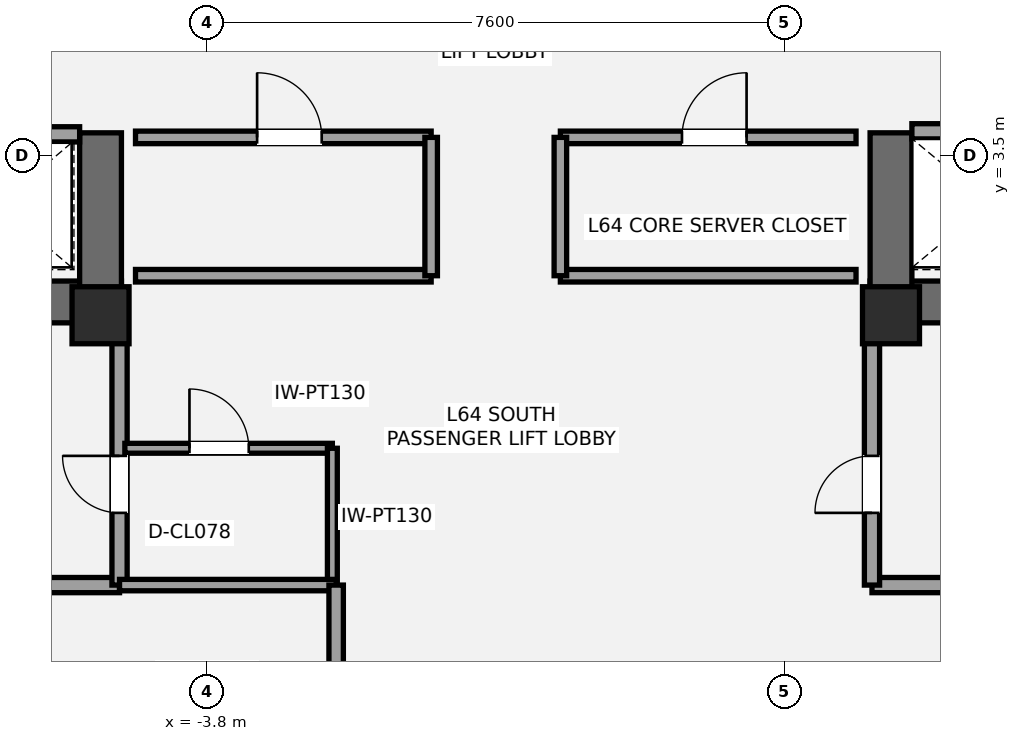
"""IFC4 building model, lengths in metres.
Left out: names, types, materials, properties, quantities, classifications, styles, units other than length and angle.
Written with IfcOpenShell. Run it as: python <this file> out.ifc"""

import sys

from ifc_helpers import new_model, si_unit, direction, frame, frame_2d, origin, origin_2d, place, context, subcontext, project, spatial, rectangle, extrude, element, fill, save


model = new_model("IFC4")
c1 = context("Model", 3, precision=1e-05, world=origin(), true_north=direction((0.0, 1.0)))
c2 = subcontext(c1, "Body", "Model", "MODEL_VIEW")
j1 = project(units=[si_unit("LENGTHUNIT", "METRE"), si_unit("PLANEANGLEUNIT", "RADIAN")], contexts=[c1])
p1 = place(None, origin())
s1 = spatial("IfcSite", under=j1, at=p1, CompositionType="ELEMENT")
p2 = place(p1, origin())
s2 = spatial("IfcBuilding", under=s1, at=p2, CompositionType="ELEMENT")
p3 = place(p2, frame((0.0, 0.0, 228.9)))
s3 = spatial("IfcBuildingStorey", under=s2, at=p3, CompositionType="ELEMENT", Elevation=228.9)
p4 = place(p3, frame((-4.925, 1.575, 0.0), z_axis=(0.0, 0.0, 1.0), x_axis=(-1.0, 0.0, 0.0)))
e1 = element("IfcWall", 1, at=p4, inside=s3, PredefinedType="SHEAR", context=c2, shape_type="SweptSolid", body=[
    extrude(rectangle(XDim=8.775, YDim=0.55, at=frame_2d((4.387, 0.0))), origin(), (0.0, 0.0, 1.0), 3.15),
])
p5 = place(p4, frame((5.375, 0.0, 0.0)))
e2 = element("IfcOpeningElement", 2, at=p5, cuts=e1, PredefinedType="OPENING", context=c2, shape_type="SweptSolid", body=[
    extrude(rectangle(XDim=1.05, YDim=2.15, at=frame_2d((0.525, 1.075))), frame((0.0, 0.285, 0.0), z_axis=(0.0, -1.0, 0.0), x_axis=(1.0, 0.0, 0.0)), (0.0, 0.0, 1.0), 0.57),
])
p6 = place(p4, frame((3.705, 0.0, 0.0)))
e3 = element("IfcOpeningElement", 3, at=p6, cuts=e1, PredefinedType="OPENING", context=c2, shape_type="SweptSolid", body=[
    extrude(rectangle(XDim=1.1, YDim=2.2, at=frame_2d((0.55, 1.1))), frame((0.0, 0.285, 0.0), z_axis=(0.0, -1.0, 0.0), x_axis=(1.0, 0.0, 0.0)), (0.0, 0.0, 1.0), 0.57),
])
p7 = place(p3, frame((-5.2, 1.3, 0.0), z_axis=(0.0, 0.0, 1.0), x_axis=(0.0, 1.0, 0.0)))
e4 = element("IfcWall", 4, at=p7, inside=s3, PredefinedType="SHEAR", context=c2, shape_type="SweptSolid", body=[
    extrude(rectangle(XDim=2.5, YDim=0.55, at=frame_2d((1.25, 0.0))), origin(), (0.0, 0.0, 1.0), 3.15),
])
p8 = place(p3, frame((13.7, 1.575, 0.0), z_axis=(0.0, 0.0, 1.0), x_axis=(-1.0, 0.0, 0.0)))
e5 = element("IfcWall", 5, at=p8, inside=s3, PredefinedType="SHEAR", context=c2, shape_type="SweptSolid", body=[
    extrude(rectangle(XDim=8.775, YDim=0.55, at=frame_2d((4.387, 0.0))), origin(), (0.0, 0.0, 1.0), 3.15),
])
p9 = place(p8, frame((2.35, 0.0, 0.0)))
e6 = element("IfcOpeningElement", 6, at=p9, cuts=e5, PredefinedType="OPENING", context=c2, shape_type="SweptSolid", body=[
    extrude(rectangle(XDim=1.05, YDim=2.15, at=frame_2d((0.525, 1.075))), frame((0.0, 0.285, 0.0), z_axis=(0.0, -1.0, 0.0), x_axis=(1.0, 0.0, 0.0)), (0.0, 0.0, 1.0), 0.57),
])
p10 = place(p8, frame((4.35, 0.0, 0.0)))
e7 = element("IfcOpeningElement", 7, at=p10, cuts=e5, PredefinedType="OPENING", context=c2, shape_type="SweptSolid", body=[
    extrude(rectangle(XDim=1.1, YDim=2.2, at=frame_2d((0.55, 1.1))), frame((0.0, 0.285, 0.0), z_axis=(0.0, -1.0, 0.0), x_axis=(1.0, 0.0, 0.0)), (0.0, 0.0, 1.0), 0.57),
])
p11 = place(p3, frame((5.2, 1.3, 0.0), z_axis=(0.0, 0.0, 1.0), x_axis=(0.0, 1.0, 0.0)))
e8 = element("IfcWall", 8, at=p11, inside=s3, PredefinedType="SHEAR", context=c2, shape_type="SweptSolid", body=[
    extrude(rectangle(XDim=2.5, YDim=0.55, at=frame_2d((1.25, 0.0))), origin(), (0.0, 0.0, 1.0), 3.15),
])
for number, where, z_axis, x_axis in (
    (9, (-5.2, 1.4, 0.0), (0.0, 0.0, 1.0), (1.0, 0.0, 0.0)),
    (10, (5.2, 1.4, 0.0), (0.0, 0.0, 1.0), (1.0, 0.0, 0.0)),
):
    element("IfcColumn", number, at=place(p3, frame(where, z_axis=z_axis, x_axis=x_axis)), inside=s3, PredefinedType="PILASTER", context=c2, shape_type="SweptSolid", body=[
        extrude(rectangle(XDim=0.75, YDim=0.75, at=origin_2d()), origin(), (0.0, 0.0, 1.0), 3.15),
    ])
p12 = place(p3, frame((-7.2, -2.15, 0.0), z_axis=(0.0, 0.0, 1.0), x_axis=(1.0, 0.0, 0.0)))
e11 = element("IfcWall", 11, at=p12, inside=s3, PredefinedType="SOLIDWALL", context=c2, shape_type="SweptSolid", body=[
    extrude(rectangle(XDim=2.25, YDim=0.2, at=frame_2d((1.125, 0.0))), origin(), (0.0, 0.0, 1.0), 2.97),
])
p13 = place(p3, frame((-4.95, -2.15, 0.0), z_axis=(0.0, 0.0, 1.0), x_axis=(0.0, 1.0, 0.0)))
e12 = element("IfcWall", 12, at=p13, inside=s3, PredefinedType="SOLIDWALL", context=c2, shape_type="SweptSolid", body=[
    extrude(rectangle(XDim=3.5, YDim=0.2, at=frame_2d((1.75, 0.0))), origin(), (0.0, 0.0, 1.0), 2.423),
])
p14 = place(p13, frame((0.95, 0.0, 0.0)))
e13 = element("IfcOpeningElement", 13, at=p14, cuts=e12, PredefinedType="OPENING", context=c2, shape_type="SweptSolid", body=[
    extrude(rectangle(XDim=0.75, YDim=2.1, at=frame_2d((0.375, 1.05))), frame((0.0, 0.11, 0.0), z_axis=(0.0, -1.0, 0.0), x_axis=(1.0, 0.0, 0.0)), (0.0, 0.0, 1.0), 0.22),
])
p15 = place(p3, frame((4.95, -2.15, 0.0), z_axis=(0.0, 0.0, 1.0), x_axis=(1.0, 0.0, 0.0)))
e14 = element("IfcWall", 14, at=p15, inside=s3, PredefinedType="SOLIDWALL", context=c2, shape_type="SweptSolid", body=[
    extrude(rectangle(XDim=2.25, YDim=0.2, at=frame_2d((1.125, 0.0))), origin(), (0.0, 0.0, 1.0), 2.97),
])
p16 = place(p3, frame((4.95, -2.15, 0.0), z_axis=(0.0, 0.0, 1.0), x_axis=(0.0, 1.0, 0.0)))
e15 = element("IfcWall", 15, at=p16, inside=s3, PredefinedType="SOLIDWALL", context=c2, shape_type="SweptSolid", body=[
    extrude(rectangle(XDim=3.5, YDim=0.2, at=frame_2d((1.75, 0.0))), origin(), (0.0, 0.0, 1.0), 2.423),
])
p17 = place(p16, frame((0.95, 0.0, 0.0)))
e16 = element("IfcOpeningElement", 16, at=p17, cuts=e15, PredefinedType="OPENING", context=c2, shape_type="SweptSolid", body=[
    extrude(rectangle(XDim=0.75, YDim=2.1, at=frame_2d((0.375, 1.05))), frame((0.0, 0.11, 0.0), z_axis=(0.0, -1.0, 0.0), x_axis=(1.0, 0.0, 0.0)), (0.0, 0.0, 1.0), 0.22),
])
p18 = place(p3, frame((-4.88, -0.35, 0.0), z_axis=(0.0, 0.0, 1.0), x_axis=(1.0, 0.0, 0.0)))
e17 = element("IfcWall", 17, at=p18, inside=s3, PredefinedType="PARTITIONING", context=c2, shape_type="SweptSolid", body=[
    extrude(rectangle(XDim=2.73, YDim=0.13, at=frame_2d((1.365, 0.0))), origin(), (0.0, 0.0, 1.0), 2.97),
])
p19 = place(p18, frame((0.85, 0.0, 0.0)))
e18 = element("IfcOpeningElement", 18, at=p19, cuts=e17, PredefinedType="OPENING", context=c2, shape_type="SweptSolid", body=[
    extrude(rectangle(XDim=0.78, YDim=2.1, at=frame_2d((0.39, 1.05))), frame((0.0, 0.075, 0.0), z_axis=(0.0, -1.0, 0.0), x_axis=(1.0, 0.0, 0.0)), (0.0, 0.0, 1.0), 0.15),
])
p20 = place(p3, frame((-2.15, -2.15, 0.0), z_axis=(0.0, 0.0, 1.0), x_axis=(0.0, 1.0, 0.0)))
e19 = element("IfcWall", 19, at=p20, inside=s3, PredefinedType="PARTITIONING", context=c2, shape_type="SweptSolid", body=[
    extrude(rectangle(XDim=1.8, YDim=0.13, at=frame_2d((0.9, 0.0))), origin(), (0.0, 0.0, 1.0), 2.97),
])
p21 = place(p3, frame((-9.78, 3.78, 0.0), z_axis=(0.0, 0.0, 1.0), x_axis=(1.0, 0.0, 0.0)))
e20 = element("IfcWall", 20, at=p21, inside=s3, PredefinedType="SOLIDWALL", context=c2, shape_type="SweptSolid", body=[
    extrude(rectangle(XDim=4.305, YDim=0.2, at=frame_2d((2.152, 0.0))), origin(), (0.0, 0.0, 1.0), 2.97),
])
p22 = place(p21, frame((2.72, 0.0, 0.0)))
e21 = element("IfcOpeningElement", 21, at=p22, cuts=e20, PredefinedType="OPENING", context=c2, shape_type="SweptSolid", body=[
    extrude(rectangle(XDim=1.1, YDim=2.2, at=frame_2d((0.55, 1.1))), frame((0.0, 0.11, 0.0), z_axis=(0.0, -1.0, 0.0), x_axis=(1.0, 0.0, 0.0)), (0.0, 0.0, 1.0), 0.22),
])
p23 = place(p3, frame((5.475, 3.82, 0.0), z_axis=(0.0, 0.0, 1.0), x_axis=(1.0, 0.0, 0.0)))
e22 = element("IfcWall", 22, at=p23, inside=s3, PredefinedType="SOLIDWALL", context=c2, shape_type="SweptSolid", body=[
    extrude(rectangle(XDim=4.305, YDim=0.2, at=frame_2d((2.152, 0.0))), origin(), (0.0, 0.0, 1.0), 2.97),
])
p24 = place(p23, frame((0.65, 0.0, 0.0)))
e23 = element("IfcOpeningElement", 23, at=p24, cuts=e22, PredefinedType="OPENING", context=c2, shape_type="SweptSolid", body=[
    extrude(rectangle(XDim=1.2, YDim=2.2, at=frame_2d((0.6, 1.1))), frame((0.0, 0.11, 0.0), z_axis=(0.0, -1.0, 0.0), x_axis=(1.0, 0.0, 0.0)), (0.0, 0.0, 1.0), 0.22),
])
p25 = place(p3, frame((-4.74, 1.92, 0.0), z_axis=(0.0, 0.0, 1.0), x_axis=(1.0, 0.0, 0.0)))
e24 = element("IfcWall", 24, at=p25, inside=s3, PredefinedType="PARTITIONING", context=c2, shape_type="SweptSolid", body=[
    extrude(rectangle(XDim=3.89, YDim=0.165, at=frame_2d((1.945, 0.0))), origin(), (0.0, 0.0, 1.0), 2.11),
])
p26 = place(p3, frame((-4.74, 3.74, 0.0), z_axis=(0.0, 0.0, 1.0), x_axis=(1.0, 0.0, 0.0)))
e25 = element("IfcWall", 25, at=p26, inside=s3, PredefinedType="PARTITIONING", context=c2, shape_type="SweptSolid", body=[
    extrude(rectangle(XDim=3.89, YDim=0.165, at=frame_2d((1.945, 0.0))), origin(), (0.0, 0.0, 1.0), 2.97),
])
p27 = place(p26, frame((1.6, 0.0, 0.0)))
e26 = element("IfcOpeningElement", 26, at=p27, cuts=e25, PredefinedType="OPENING", context=c2, shape_type="SweptSolid", body=[
    extrude(rectangle(XDim=0.85, YDim=2.1, at=frame_2d((0.425, 1.05))), frame((0.0, 0.093, 0.0), z_axis=(0.0, -1.0, 0.0), x_axis=(1.0, 0.0, 0.0)), (0.0, 0.0, 1.0), 0.185),
])
p28 = place(p3, frame((-0.85, 1.92, 0.0), z_axis=(0.0, 0.0, 1.0), x_axis=(0.0, 1.0, 0.0)))
e27 = element("IfcWall", 27, at=p28, inside=s3, PredefinedType="PARTITIONING", context=c2, shape_type="SweptSolid", body=[
    extrude(rectangle(XDim=1.82, YDim=0.165, at=frame_2d((0.91, 0.0))), origin(), (0.0, 0.0, 1.0), 2.97),
])
p29 = place(p3, frame((0.85, 1.92, 0.0), z_axis=(0.0, 0.0, 1.0), x_axis=(1.0, 0.0, 0.0)))
e28 = element("IfcWall", 28, at=p29, inside=s3, PredefinedType="PARTITIONING", context=c2, shape_type="SweptSolid", body=[
    extrude(rectangle(XDim=3.89, YDim=0.165, at=frame_2d((1.945, 0.0))), origin(), (0.0, 0.0, 1.0), 2.11),
])
p30 = place(p3, frame((0.85, 3.74, 0.0), z_axis=(0.0, 0.0, 1.0), x_axis=(1.0, 0.0, 0.0)))
e29 = element("IfcWall", 29, at=p30, inside=s3, PredefinedType="PARTITIONING", context=c2, shape_type="SweptSolid", body=[
    extrude(rectangle(XDim=3.89, YDim=0.165, at=frame_2d((1.945, 0.0))), origin(), (0.0, 0.0, 1.0), 2.97),
])
p31 = place(p30, frame((1.6, 0.0, 0.0)))
e30 = element("IfcOpeningElement", 30, at=p31, cuts=e29, PredefinedType="OPENING", context=c2, shape_type="SweptSolid", body=[
    extrude(rectangle(XDim=0.85, YDim=2.1, at=frame_2d((0.425, 1.05))), frame((0.0, 0.093, 0.0), z_axis=(0.0, -1.0, 0.0), x_axis=(1.0, 0.0, 0.0)), (0.0, 0.0, 1.0), 0.185),
])
p32 = place(p3, frame((0.85, 1.92, 0.0), z_axis=(0.0, 0.0, 1.0), x_axis=(0.0, 1.0, 0.0)))
e31 = element("IfcWall", 31, at=p32, inside=s3, PredefinedType="PARTITIONING", context=c2, shape_type="SweptSolid", body=[
    extrude(rectangle(XDim=1.82, YDim=0.165, at=frame_2d((0.91, 0.0))), origin(), (0.0, 0.0, 1.0), 2.97),
])
p33 = place(p3, frame((-4.95, -2.15, 0.0), z_axis=(0.0, 0.0, 1.0), x_axis=(1.0, 0.0, 0.0)))
e32 = element("IfcWall", 32, at=p33, inside=s3, PredefinedType="PLUMBINGWALL", context=c2, shape_type="SweptSolid", body=[
    extrude(rectangle(XDim=2.85, YDim=0.15, at=frame_2d((1.425, 0.0))), origin(), (0.0, 0.0, 1.0), 2.423),
])
p34 = place(p3, frame((-2.1, -4.05, 0.0), z_axis=(0.0, 0.0, 1.0), x_axis=(0.0, 1.0, 0.0)))
e33 = element("IfcWall", 33, at=p34, inside=s3, PredefinedType="PLUMBINGWALL", context=c2, shape_type="SweptSolid", body=[
    extrude(rectangle(XDim=1.9, YDim=0.19, at=frame_2d((0.95, 0.0))), origin(), (0.0, 0.0, 1.0), 2.423),
])
p35 = place(p14, origin())
e34 = element("IfcDoor", 34, at=p35, inside=s3, OperationType="SINGLE_SWING_RIGHT", PredefinedType="DOOR", context=c2, shape_type="SweptSolid", body=[
    extrude(rectangle(XDim=0.75, YDim=2.1, at=frame_2d((0.375, 1.05))), frame((0.0, 0.025, 0.0), z_axis=(0.0, -1.0, 0.0), x_axis=(1.0, 0.0, 0.0)), (0.0, 0.0, 1.0), 0.05),
])
fill(e13, e34)
p36 = place(p17, origin())
e35 = element("IfcDoor", 35, at=p36, inside=s3, OperationType="SINGLE_SWING_LEFT", PredefinedType="DOOR", context=c2, shape_type="SweptSolid", body=[
    extrude(rectangle(XDim=0.75, YDim=2.1, at=frame_2d((0.375, 1.05))), frame((0.0, 0.025, 0.0), z_axis=(0.0, -1.0, 0.0), x_axis=(1.0, 0.0, 0.0)), (0.0, 0.0, 1.0), 0.05),
])
fill(e16, e35)
p37 = place(p19, origin())
e36 = element("IfcDoor", 36, at=p37, inside=s3, OperationType="SINGLE_SWING_LEFT", PredefinedType="DOOR", context=c2, shape_type="SweptSolid", body=[
    extrude(rectangle(XDim=0.78, YDim=2.1, at=frame_2d((0.39, 1.05))), frame((0.0, 0.025, 0.0), z_axis=(0.0, -1.0, 0.0), x_axis=(1.0, 0.0, 0.0)), (0.0, 0.0, 1.0), 0.05),
])
fill(e18, e36)
p38 = place(p27, origin())
e37 = element("IfcDoor", 37, at=p38, inside=s3, OperationType="SINGLE_SWING_LEFT", PredefinedType="DOOR", context=c2, shape_type="SweptSolid", body=[
    extrude(rectangle(XDim=0.85, YDim=2.1, at=frame_2d((0.425, 1.05))), frame((0.0, 0.025, 0.0), z_axis=(0.0, -1.0, 0.0), x_axis=(1.0, 0.0, 0.0)), (0.0, 0.0, 1.0), 0.05),
])
fill(e26, e37)
p39 = place(p31, origin())
e38 = element("IfcDoor", 38, at=p39, inside=s3, OperationType="SINGLE_SWING_RIGHT", PredefinedType="DOOR", context=c2, shape_type="SweptSolid", body=[
    extrude(rectangle(XDim=0.85, YDim=2.1, at=frame_2d((0.425, 1.05))), frame((0.0, 0.025, 0.0), z_axis=(0.0, -1.0, 0.0), x_axis=(1.0, 0.0, 0.0)), (0.0, 0.0, 1.0), 0.05),
])
fill(e30, e38)
save(model, sys.argv[1])
